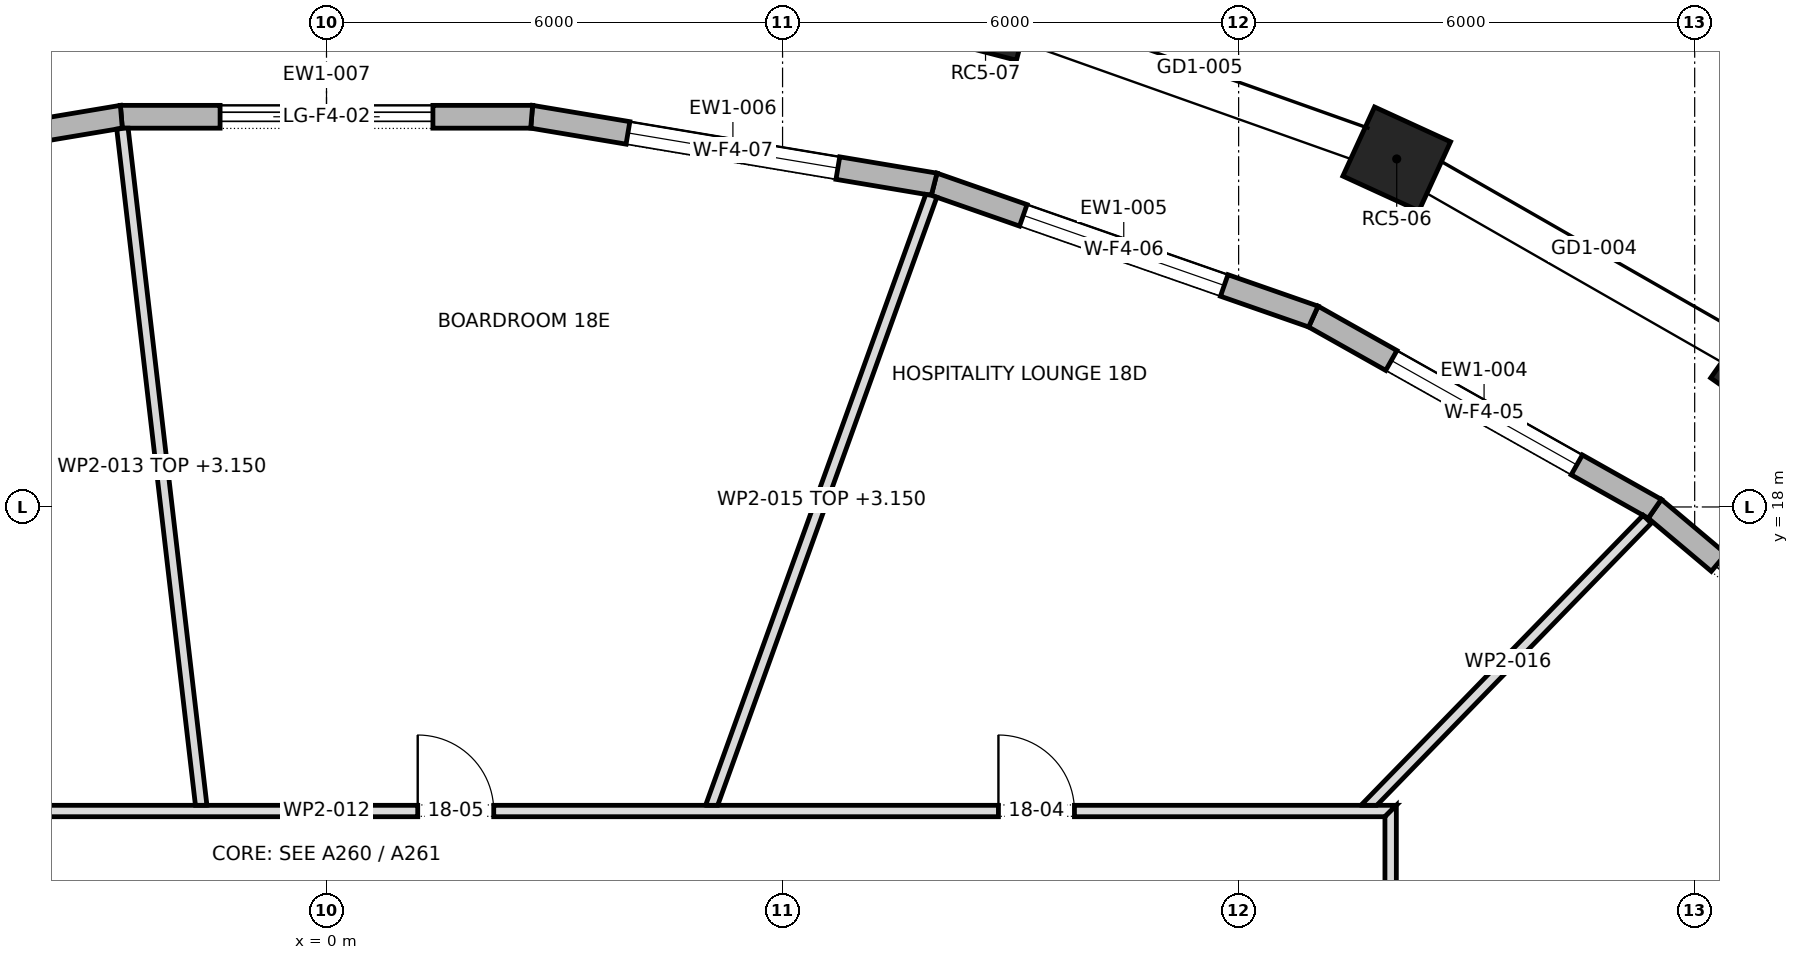
"""IFC4 building model, lengths in metres.
Left out: names, types, materials, properties, quantities, classifications, styles, units other than length and angle.
Written with IfcOpenShell. Run it as: python <this file> out.ifc"""

import sys

from ifc_helpers import new_model, si_unit, direction, frame, frame_2d, origin, origin_2d, place, context, subcontext, project, spatial, polyline, rectangle, outline, extrude, element, fill, save


model = new_model("IFC4")
c1 = context("Model", 3, precision=1e-05, world=origin(), true_north=direction((0.0, 1.0)))
c2 = subcontext(c1, "Body", "Model", "MODEL_VIEW")
j1 = project(units=[si_unit("LENGTHUNIT", "METRE"), si_unit("PLANEANGLEUNIT", "RADIAN")], contexts=[c1])
p1 = place(None, origin())
s1 = spatial("IfcSite", under=j1, at=p1, CompositionType="ELEMENT")
p2 = place(p1, origin())
s2 = spatial("IfcBuilding", under=s1, at=p2, CompositionType="ELEMENT")
p3 = place(p2, frame((0.0, 0.0, 264.3)))
s3 = spatial("IfcBuildingStorey", under=s2, at=p3, CompositionType="ELEMENT", Elevation=264.3)
for number, where, z_axis, x_axis in (
    (1, (18.948, 19.79, 0.0), (0.0, 0.0, 1.0), (-0.818, 0.575, 0.0)),
    (2, (14.08, 22.579, 0.0), (0.0, 0.0, 1.0), (-0.909, 0.417, 0.0)),
    (3, (8.67, 24.499, 0.0), (0.0, 0.0, 1.0), (-0.968, 0.252, 0.0)),
):
    element("IfcColumn", number, at=place(p3, frame(where, z_axis=z_axis, x_axis=x_axis)), inside=s3, PredefinedType="COLUMN", context=c2, shape_type="SweptSolid", body=[
        extrude(rectangle(XDim=1.1, YDim=1.0, at=origin_2d()), origin(), (0.0, 0.0, 1.0), 4.0),
    ])
p4 = place(p3, frame((21.297, 14.756, 0.0), z_axis=(0.0, 0.0, 1.0), x_axis=(-0.764746492461, 0.644331283013, 0.0)))
e4 = element("IfcWall", 4, at=p4, inside=s3, PredefinedType="STANDARD", context=c2, shape_type="SweptSolid", body=[
    extrude(outline(polyline([(-0.015, -0.15), (5.012, -0.15), (4.984, 0.15), (0.015, 0.15), (-0.015, -0.15)])), origin(), (0.0, 0.0, 1.0), 3.7),
])
p5 = place(p4, frame((1.099, 0.0, 0.0)))
e5 = element("IfcOpeningElement", 5, at=p5, cuts=e4, PredefinedType="OPENING", context=c2, shape_type="SweptSolid", body=[
    extrude(rectangle(XDim=2.8, YDim=3.25, at=frame_2d((1.4, 1.625))), frame((0.0, 0.162, 0.0), z_axis=(0.0, -1.0, 0.0), x_axis=(1.0, 0.0, 0.0)), (0.0, 0.0, 1.0), 0.324),
])
p6 = place(p3, frame((17.475, 17.976, 0.0), z_axis=(0.0, 0.0, 1.0), x_axis=(-0.871411047742, 0.490553550465, 0.0)))
e6 = element("IfcWall", 6, at=p6, inside=s3, PredefinedType="STANDARD", context=c2, shape_type="SweptSolid", body=[
    extrude(outline(polyline([(-0.014, -0.15), (5.168, -0.15), (5.141, 0.15), (0.014, 0.15), (-0.014, -0.15)])), origin(), (0.0, 0.0, 1.0), 3.7),
])
p7 = place(p6, frame((1.177, 0.0, 0.6)))
e7 = element("IfcOpeningElement", 7, at=p7, cuts=e6, PredefinedType="OPENING", context=c2, shape_type="SweptSolid", body=[
    extrude(rectangle(XDim=2.8, YDim=2.65, at=frame_2d((1.4, 1.325))), frame((0.0, 0.162, 0.0), z_axis=(0.0, -1.0, 0.0), x_axis=(1.0, 0.0, 0.0)), (0.0, 0.0, 1.0), 0.324),
])
p8 = place(p3, frame((12.983, 20.505, 0.0), z_axis=(0.0, 0.0, 1.0), x_axis=(-0.944149712872, 0.32951679727, 0.0)))
e8 = element("IfcWall", 8, at=p8, inside=s3, PredefinedType="STANDARD", context=c2, shape_type="SweptSolid", body=[
    extrude(outline(polyline([(-0.013, -0.15), (5.297, -0.15), (5.271, 0.15), (0.013, 0.15), (-0.013, -0.15)])), origin(), (0.0, 0.0, 1.0), 3.7),
])
p9 = place(p8, frame((1.242, 0.0, 0.6)))
e9 = element("IfcOpeningElement", 9, at=p9, cuts=e8, PredefinedType="OPENING", context=c2, shape_type="SweptSolid", body=[
    extrude(rectangle(XDim=2.8, YDim=2.65, at=frame_2d((1.4, 1.325))), frame((0.0, 0.162, 0.0), z_axis=(0.0, -1.0, 0.0), x_axis=(1.0, 0.0, 0.0)), (0.0, 0.0, 1.0), 0.324),
])
p10 = place(p3, frame((7.994, 22.246, 0.0), z_axis=(0.0, 0.0, 1.0), x_axis=(-0.986243571741, 0.165298569867, 0.0)))
e10 = element("IfcWall", 10, at=p10, inside=s3, PredefinedType="STANDARD", context=c2, shape_type="SweptSolid", body=[
    extrude(outline(polyline([(-0.013, -0.15), (5.381, -0.15), (5.356, 0.15), (0.013, 0.15), (-0.013, -0.15)])), origin(), (0.0, 0.0, 1.0), 3.7),
])
p11 = place(p10, frame((1.284, 0.0, 0.6)))
e11 = element("IfcOpeningElement", 11, at=p11, cuts=e10, PredefinedType="OPENING", context=c2, shape_type="SweptSolid", body=[
    extrude(rectangle(XDim=2.8, YDim=2.65, at=frame_2d((1.4, 1.325))), frame((0.0, 0.162, 0.0), z_axis=(0.0, -1.0, 0.0), x_axis=(1.0, 0.0, 0.0)), (0.0, 0.0, 1.0), 0.324),
])
p12 = place(p3, frame((2.699, 23.134, 0.0), z_axis=(0.0, 0.0, 1.0), x_axis=(-1.0, 0.0, 0.0)))
e12 = element("IfcWall", 12, at=p12, inside=s3, PredefinedType="STANDARD", context=c2, shape_type="SweptSolid", body=[
    extrude(outline(polyline([(-0.012, -0.15), (5.411, -0.15), (5.386, 0.15), (0.012, 0.15), (-0.012, -0.15)])), origin(), (0.0, 0.0, 1.0), 3.7),
])
p13 = place(p12, frame((1.299, 0.0, 0.0)))
e13 = element("IfcOpeningElement", 13, at=p13, cuts=e12, PredefinedType="OPENING", context=c2, shape_type="SweptSolid", body=[
    extrude(rectangle(XDim=2.8, YDim=3.25, at=frame_2d((1.4, 1.625))), frame((0.0, 0.162, 0.0), z_axis=(0.0, -1.0, 0.0), x_axis=(1.0, 0.0, 0.0)), (0.0, 0.0, 1.0), 0.324),
])
p14 = place(p3, frame((-2.699, 23.134, 0.0), z_axis=(0.0, 0.0, 1.0), x_axis=(-0.986243571741, -0.165298569867, 0.0)))
e14 = element("IfcWall", 14, at=p14, inside=s3, PredefinedType="STANDARD", context=c2, shape_type="SweptSolid", body=[
    extrude(outline(polyline([(-0.012, -0.15), (5.382, -0.15), (5.356, 0.15), (0.012, 0.15), (-0.012, -0.15)])), origin(), (0.0, 0.0, 1.0), 3.7),
])
p15 = place(p14, frame((1.284, 0.0, 0.6)))
e15 = element("IfcOpeningElement", 15, at=p15, cuts=e14, PredefinedType="OPENING", context=c2, shape_type="SweptSolid", body=[
    extrude(rectangle(XDim=2.8, YDim=2.65, at=frame_2d((1.4, 1.325))), frame((0.0, 0.162, 0.0), z_axis=(0.0, -1.0, 0.0), x_axis=(1.0, 0.0, 0.0)), (0.0, 0.0, 1.0), 0.324),
])
p16 = place(p3, frame((-14.075, 14.0, 0.0), z_axis=(0.0, 0.0, 1.0), x_axis=(1.0, 0.0, 0.0)))
e16 = element("IfcWall", 16, at=p16, inside=s3, PredefinedType="PARTITIONING", context=c2, shape_type="SweptSolid", body=[
    extrude(outline(polyline([(0.15, -0.075), (2.139, -0.075), (4.128, -0.075), (6.118, -0.075), (8.107, -0.075), (10.096, -0.075), (12.086, -0.075), (14.075, -0.075), (16.064, -0.075), (18.053, -0.075), (20.043, -0.075), (22.032, -0.075), (24.021, -0.075), (26.011, -0.075), (28.0, -0.075), (28.15, 0.075), (26.273, 0.075), (24.396, 0.075), (22.52, 0.075), (20.643, 0.075), (18.767, 0.075), (16.89, 0.075), (15.013, 0.075), (13.137, 0.075), (11.26, 0.075), (9.383, 0.075), (7.507, 0.075), (5.63, 0.075), (3.753, 0.075), (1.877, 0.075), (0.0, 0.075), (0.15, -0.075)])), origin(), (0.0, 0.0, 1.0), 3.7),
])
p17 = place(p16, frame((22.915, 0.0, 0.0)))
e17 = element("IfcOpeningElement", 17, at=p17, cuts=e16, PredefinedType="OPENING", context=c2, shape_type="SweptSolid", body=[
    extrude(rectangle(XDim=1.0, YDim=2.1, at=frame_2d((0.5, 1.05))), frame((0.0, 0.087, 0.0), z_axis=(0.0, -1.0, 0.0), x_axis=(1.0, 0.0, 0.0)), (0.0, 0.0, 1.0), 0.174),
])
p18 = place(p16, frame((15.275, 0.0, 0.0)))
e18 = element("IfcOpeningElement", 18, at=p18, cuts=e16, PredefinedType="OPENING", context=c2, shape_type="SweptSolid", body=[
    extrude(rectangle(XDim=1.0, YDim=2.1, at=frame_2d((0.5, 1.05))), frame((0.0, 0.087, 0.0), z_axis=(0.0, -1.0, 0.0), x_axis=(1.0, 0.0, 0.0)), (0.0, 0.0, 1.0), 0.174),
])
p19 = place(p16, frame((5.355, 0.0, 0.0)))
e19 = element("IfcOpeningElement", 19, at=p19, cuts=e16, PredefinedType="OPENING", context=c2, shape_type="SweptSolid", body=[
    extrude(rectangle(XDim=1.8, YDim=2.1, at=frame_2d((0.9, 1.05))), frame((0.0, 0.087, 0.0), z_axis=(0.0, -1.0, 0.0), x_axis=(1.0, 0.0, 0.0)), (0.0, 0.0, 1.0), 0.174),
])
p20 = place(p3, frame((-1.648, 14.067, 0.0), z_axis=(0.0, 0.0, 1.0), x_axis=(-0.115608238976, 0.993294888279, 0.0)))
e20 = element("IfcWall", 20, at=p20, inside=s3, PredefinedType="PARTITIONING", context=c2, shape_type="SweptSolid", body=[
    extrude(outline(polyline([(0.0, -0.075), (1.794, -0.075), (3.587, -0.075), (5.381, -0.075), (7.175, -0.075), (8.968, -0.075), (8.973, -0.036), (8.973, 0.075), (7.182, 0.075), (5.391, 0.075), (3.599, 0.075), (1.808, 0.075), (0.017, 0.075), (0.0, -0.072), (0.0, -0.075)])), origin(), (0.0, 0.0, 1.0), 3.15),
])
p21 = place(p3, frame((5.058, 14.05, 0.0), z_axis=(0.0, 0.0, 1.0), x_axis=(0.339015479588, 0.940780795191, 0.0)))
e21 = element("IfcWall", 21, at=p21, inside=s3, PredefinedType="PARTITIONING", context=c2, shape_type="SweptSolid", body=[
    extrude(outline(polyline([(8.557, -0.075), (8.557, -0.05), (8.556, 0.002), (8.543, 0.075), (6.834, 0.075), (5.126, 0.075), (3.417, 0.075), (1.709, 0.075), (0.0, 0.075), (0.0, 0.074), (0.054, -0.075), (1.754, -0.075), (3.455, -0.075), (5.156, -0.075), (6.856, -0.075), (8.557, -0.075)])), origin(), (0.0, 0.0, 1.0), 3.15),
])
p22 = place(p3, frame((13.662, 14.023, 0.0), z_axis=(0.0, 0.0, 1.0), x_axis=(0.697340314613, 0.716740179992, 0.0)))
e22 = element("IfcWall", 22, at=p22, inside=s3, PredefinedType="PARTITIONING", context=c2, shape_type="SweptSolid", body=[
    extrude(outline(polyline([(0.0, 0.075), (0.0, 0.075), (0.146, -0.075), (1.871, -0.075), (3.597, -0.075), (5.323, -0.075), (5.323, 0.075), (3.549, 0.075), (1.774, 0.075), (0.0, 0.075)])), origin(), (0.0, 0.0, 1.0), 3.7),
])
p23 = place(p3, frame((14.0, -14.075, 0.0), z_axis=(0.0, 0.0, 1.0), x_axis=(0.0, 1.0, 0.0)))
e23 = element("IfcWall", 23, at=p23, inside=s3, PredefinedType="PARTITIONING", context=c2, shape_type="SweptSolid", body=[
    extrude(outline(polyline([(0.0, -0.075), (1.877, -0.075), (3.753, -0.075), (5.63, -0.075), (7.507, -0.075), (9.383, -0.075), (11.26, -0.075), (13.137, -0.075), (15.013, -0.075), (16.89, -0.075), (18.767, -0.075), (20.643, -0.075), (22.52, -0.075), (24.396, -0.075), (26.273, -0.075), (28.15, -0.075), (28.0, 0.075), (26.011, 0.075), (24.021, 0.075), (22.032, 0.075), (20.043, 0.075), (18.053, 0.075), (16.064, 0.075), (14.075, 0.075), (12.086, 0.075), (10.096, 0.075), (8.107, 0.075), (6.118, 0.075), (4.128, 0.075), (2.139, 0.075), (0.15, 0.075), (0.0, -0.075)])), origin(), (0.0, 0.0, 1.0), 3.7),
])
p24 = place(p23, frame((12.365, 0.0, 0.0)))
e24 = element("IfcOpeningElement", 24, at=p24, cuts=e23, PredefinedType="OPENING", context=c2, shape_type="SweptSolid", body=[
    extrude(rectangle(XDim=1.0, YDim=2.1, at=frame_2d((0.5, 1.05))), frame((0.0, 0.087, 0.0), z_axis=(0.0, -1.0, 0.0), x_axis=(1.0, 0.0, 0.0)), (0.0, 0.0, 1.0), 0.174),
])
p25 = place(p23, frame((20.755, 0.0, 0.0)))
e25 = element("IfcOpeningElement", 25, at=p25, cuts=e23, PredefinedType="OPENING", context=c2, shape_type="SweptSolid", body=[
    extrude(rectangle(XDim=1.8, YDim=2.1, at=frame_2d((0.9, 1.05))), frame((0.0, 0.087, 0.0), z_axis=(0.0, -1.0, 0.0), x_axis=(1.0, 0.0, 0.0)), (0.0, 0.0, 1.0), 0.174),
])
p26 = place(p5, origin())
e26 = element("IfcDoor", 26, at=p26, inside=s3, OperationType="DOUBLE_DOOR_SLIDING", PredefinedType="DOOR", context=c2, shape_type="SweptSolid", body=[
    extrude(rectangle(XDim=2.8, YDim=3.25, at=frame_2d((1.4, 1.625))), frame((0.0, 0.025, 0.0), z_axis=(0.0, -1.0, 0.0), x_axis=(1.0, 0.0, 0.0)), (0.0, 0.0, 1.0), 0.05),
])
fill(e5, e26)
p27 = place(p7, origin())
e27 = element("IfcWindow", 27, at=p27, inside=s3, PartitioningType="DOUBLE_PANEL_VERTICAL", PredefinedType="WINDOW", context=c2, shape_type="SweptSolid", body=[
    extrude(rectangle(XDim=2.8, YDim=2.65, at=frame_2d((1.4, 1.325))), frame((0.0, 0.03, 0.0), z_axis=(0.0, -1.0, 0.0), x_axis=(1.0, 0.0, 0.0)), (0.0, 0.0, 1.0), 0.06),
])
fill(e7, e27)
p28 = place(p9, origin())
e28 = element("IfcWindow", 28, at=p28, inside=s3, PartitioningType="DOUBLE_PANEL_VERTICAL", PredefinedType="WINDOW", context=c2, shape_type="SweptSolid", body=[
    extrude(rectangle(XDim=2.8, YDim=2.65, at=frame_2d((1.4, 1.325))), frame((0.0, 0.03, 0.0), z_axis=(0.0, -1.0, 0.0), x_axis=(1.0, 0.0, 0.0)), (0.0, 0.0, 1.0), 0.06),
])
fill(e9, e28)
p29 = place(p11, origin())
e29 = element("IfcWindow", 29, at=p29, inside=s3, PartitioningType="DOUBLE_PANEL_VERTICAL", PredefinedType="WINDOW", context=c2, shape_type="SweptSolid", body=[
    extrude(rectangle(XDim=2.8, YDim=2.65, at=frame_2d((1.4, 1.325))), frame((0.0, 0.03, 0.0), z_axis=(0.0, -1.0, 0.0), x_axis=(1.0, 0.0, 0.0)), (0.0, 0.0, 1.0), 0.06),
])
fill(e11, e29)
p30 = place(p13, origin())
e30 = element("IfcDoor", 30, at=p30, inside=s3, OperationType="DOUBLE_DOOR_SLIDING", PredefinedType="DOOR", context=c2, shape_type="SweptSolid", body=[
    extrude(rectangle(XDim=2.8, YDim=3.25, at=frame_2d((1.4, 1.625))), frame((0.0, 0.025, 0.0), z_axis=(0.0, -1.0, 0.0), x_axis=(1.0, 0.0, 0.0)), (0.0, 0.0, 1.0), 0.05),
])
fill(e13, e30)
p31 = place(p17, origin())
e31 = element("IfcDoor", 31, at=p31, inside=s3, OperationType="SINGLE_SWING_RIGHT", PredefinedType="DOOR", context=c2, shape_type="SweptSolid", body=[
    extrude(rectangle(XDim=1.0, YDim=2.1, at=frame_2d((0.5, 1.05))), frame((0.0, 0.025, 0.0), z_axis=(0.0, -1.0, 0.0), x_axis=(1.0, 0.0, 0.0)), (0.0, 0.0, 1.0), 0.05),
])
fill(e17, e31)
p32 = place(p18, origin())
e32 = element("IfcDoor", 32, at=p32, inside=s3, OperationType="SINGLE_SWING_RIGHT", PredefinedType="DOOR", context=c2, shape_type="SweptSolid", body=[
    extrude(rectangle(XDim=1.0, YDim=2.1, at=frame_2d((0.5, 1.05))), frame((0.0, 0.025, 0.0), z_axis=(0.0, -1.0, 0.0), x_axis=(1.0, 0.0, 0.0)), (0.0, 0.0, 1.0), 0.05),
])
fill(e18, e32)
save(model, sys.argv[1])
